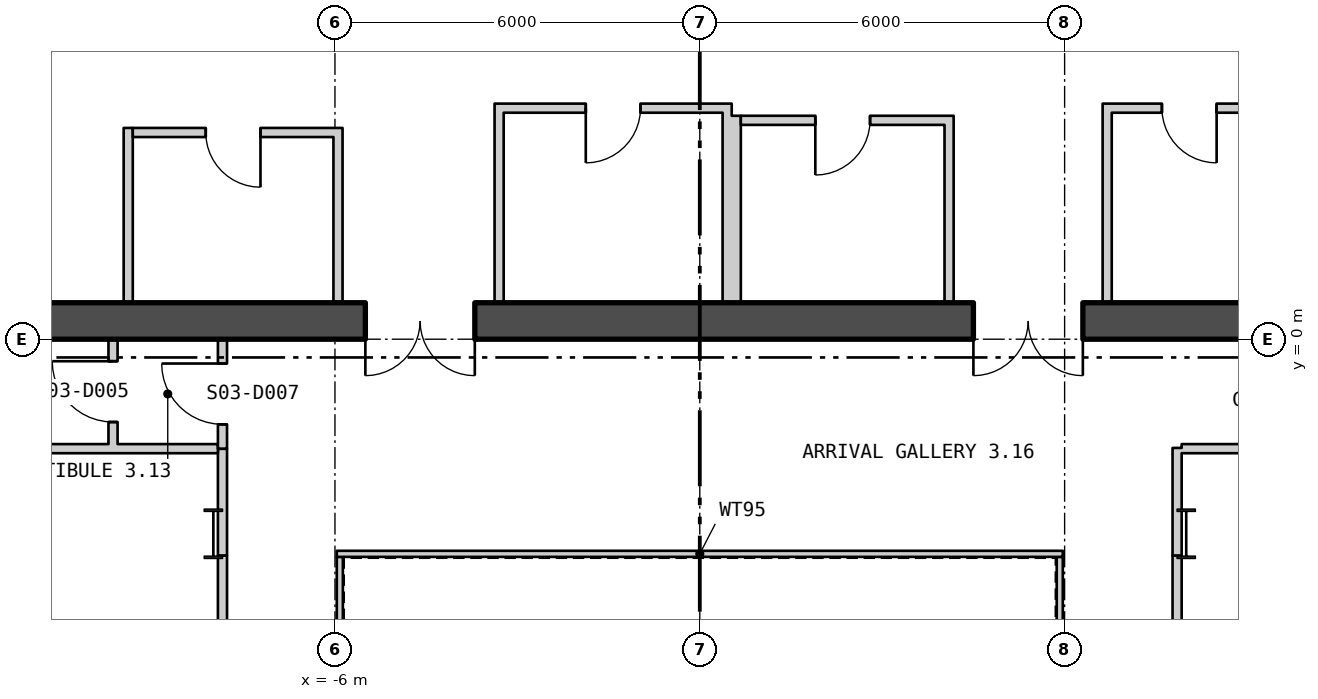
"""IFC4 building model, lengths in metres.
Left out: names, types, materials, properties, quantities, classifications, styles, units other than length and angle.
Written with IfcOpenShell. Run it as: python <this file> out.ifc"""

import sys

from ifc_helpers import new_model, si_unit, direction, frame, frame_2d, origin, origin_2d, place, context, subcontext, project, spatial, polyline, rectangle, i_section, outline, extrude, element, fill, save


model = new_model("IFC4")
c1 = context("Model", 3, precision=1e-05, world=origin(), true_north=direction((0.0, 1.0)))
c2 = subcontext(c1, "Body", "Model", "MODEL_VIEW")
j1 = project(units=[si_unit("LENGTHUNIT", "METRE"), si_unit("PLANEANGLEUNIT", "RADIAN")], contexts=[c1])
p1 = place(None, origin())
s1 = spatial("IfcSite", under=j1, at=p1, CompositionType="ELEMENT")
p2 = place(p1, origin())
s2 = spatial("IfcBuilding", under=s1, at=p2, CompositionType="ELEMENT")
p3 = place(p2, frame((0.0, 0.0, 46.8)))
s3 = spatial("IfcBuildingStorey", under=s2, at=p3, CompositionType="ELEMENT", Elevation=46.8)
for number, where, z_axis, x_axis in (
    (1, (8.0, -3.2, 0.0), (0.0, 0.0, 1.0), (1.0, 0.0, 0.0)),
    (2, (-8.0, -3.2, 0.0), (0.0, 0.0, 1.0), (1.0, 0.0, 0.0)),
):
    element("IfcColumn", number, at=place(p3, frame(where, z_axis=z_axis, x_axis=x_axis)), inside=s3, PredefinedType="COLUMN", context=c2, shape_type="SweptSolid", body=[
        extrude(i_section(OverallWidth=0.303, OverallDepth=0.814, WebThickness=0.021, FlangeThickness=0.04, at=origin_2d()), origin(), (0.0, 0.0, 1.0), 4.5),
    ])
p4 = place(p3, frame((-28.445, 10.319, -0.18), z_axis=(0.0, 0.0, 1.0), x_axis=(0.499999764979, -0.866025539474, 0.0)))
e3 = element("IfcWall", 3, at=p4, inside=s3, PredefinedType="SOLIDWALL", context=c2, shape_type="SweptSolid", body=[
    extrude(outline(polyline([(-0.13, -0.225), (45.87, -0.225), (45.61, 0.225), (0.13, 0.225), (-0.13, -0.225)])), origin(), (0.0, 0.0, 1.0), 4.28),
])
p5 = place(p4, frame((1.424, 0.0, 1.08)))
e4 = element("IfcOpeningElement", 4, at=p5, cuts=e3, PredefinedType="OPENING", context=c2, shape_type="SweptSolid", body=[
    extrude(rectangle(XDim=2.4, YDim=2.6, at=frame_2d((1.2, 1.3))), frame((0.0, 0.235, 0.0), z_axis=(0.0, -1.0, 0.0), x_axis=(1.0, 0.0, 0.0)), (0.0, 0.0, 1.0), 0.47),
])
p6 = place(p4, frame((5.893, 0.0, 1.08)))
e5 = element("IfcOpeningElement", 5, at=p6, cuts=e3, PredefinedType="OPENING", context=c2, shape_type="SweptSolid", body=[
    extrude(rectangle(XDim=2.4, YDim=2.6, at=frame_2d((1.2, 1.3))), frame((0.0, 0.235, 0.0), z_axis=(0.0, -1.0, 0.0), x_axis=(1.0, 0.0, 0.0)), (0.0, 0.0, 1.0), 0.47),
])
p7 = place(p4, frame((10.401, 0.0, 1.08)))
e6 = element("IfcOpeningElement", 6, at=p7, cuts=e3, PredefinedType="OPENING", context=c2, shape_type="SweptSolid", body=[
    extrude(rectangle(XDim=2.4, YDim=2.6, at=frame_2d((1.2, 1.3))), frame((0.0, 0.235, 0.0), z_axis=(0.0, -1.0, 0.0), x_axis=(1.0, 0.0, 0.0)), (0.0, 0.0, 1.0), 0.47),
])
p8 = place(p4, frame((14.909, 0.0, 1.08)))
e7 = element("IfcOpeningElement", 7, at=p8, cuts=e3, PredefinedType="OPENING", context=c2, shape_type="SweptSolid", body=[
    extrude(rectangle(XDim=2.4, YDim=2.6, at=frame_2d((1.2, 1.3))), frame((0.0, 0.235, 0.0), z_axis=(0.0, -1.0, 0.0), x_axis=(1.0, 0.0, 0.0)), (0.0, 0.0, 1.0), 0.47),
])
p9 = place(p4, frame((19.416, 0.0, 1.08)))
e8 = element("IfcOpeningElement", 8, at=p9, cuts=e3, PredefinedType="OPENING", context=c2, shape_type="SweptSolid", body=[
    extrude(rectangle(XDim=2.4, YDim=2.6, at=frame_2d((1.2, 1.3))), frame((0.0, 0.235, 0.0), z_axis=(0.0, -1.0, 0.0), x_axis=(1.0, 0.0, 0.0)), (0.0, 0.0, 1.0), 0.47),
])
p10 = place(p4, frame((23.924, 0.0, 1.08)))
e9 = element("IfcOpeningElement", 9, at=p10, cuts=e3, PredefinedType="OPENING", context=c2, shape_type="SweptSolid", body=[
    extrude(rectangle(XDim=2.4, YDim=2.6, at=frame_2d((1.2, 1.3))), frame((0.0, 0.235, 0.0), z_axis=(0.0, -1.0, 0.0), x_axis=(1.0, 0.0, 0.0)), (0.0, 0.0, 1.0), 0.47),
])
p11 = place(p4, frame((28.431, 0.0, 1.08)))
e10 = element("IfcOpeningElement", 10, at=p11, cuts=e3, PredefinedType="OPENING", context=c2, shape_type="SweptSolid", body=[
    extrude(rectangle(XDim=2.4, YDim=2.6, at=frame_2d((1.2, 1.3))), frame((0.0, 0.235, 0.0), z_axis=(0.0, -1.0, 0.0), x_axis=(1.0, 0.0, 0.0)), (0.0, 0.0, 1.0), 0.47),
])
p12 = place(p4, frame((32.939, 0.0, 1.08)))
e11 = element("IfcOpeningElement", 11, at=p12, cuts=e3, PredefinedType="OPENING", context=c2, shape_type="SweptSolid", body=[
    extrude(rectangle(XDim=2.4, YDim=2.6, at=frame_2d((1.2, 1.3))), frame((0.0, 0.235, 0.0), z_axis=(0.0, -1.0, 0.0), x_axis=(1.0, 0.0, 0.0)), (0.0, 0.0, 1.0), 0.47),
])
p13 = place(p4, frame((37.447, 0.0, 1.08)))
e12 = element("IfcOpeningElement", 12, at=p13, cuts=e3, PredefinedType="OPENING", context=c2, shape_type="SweptSolid", body=[
    extrude(rectangle(XDim=2.4, YDim=2.6, at=frame_2d((1.2, 1.3))), frame((0.0, 0.235, 0.0), z_axis=(0.0, -1.0, 0.0), x_axis=(1.0, 0.0, 0.0)), (0.0, 0.0, 1.0), 0.47),
])
p14 = place(p4, frame((41.916, 0.0, 1.08)))
e13 = element("IfcOpeningElement", 13, at=p14, cuts=e3, PredefinedType="OPENING", context=c2, shape_type="SweptSolid", body=[
    extrude(rectangle(XDim=2.4, YDim=2.6, at=frame_2d((1.2, 1.3))), frame((0.0, 0.235, 0.0), z_axis=(0.0, -1.0, 0.0), x_axis=(1.0, 0.0, 0.0)), (0.0, 0.0, 1.0), 0.47),
])
p15 = place(p3, frame((5.575, -29.294, -0.18), z_axis=(0.0, 0.0, 1.0), x_axis=(0.499999764979, 0.866025539474, 0.0)))
e14 = element("IfcWall", 14, at=p15, inside=s3, PredefinedType="SOLIDWALL", context=c2, shape_type="SweptSolid", body=[
    extrude(outline(polyline([(-0.13, -0.225), (45.87, -0.225), (45.61, 0.225), (0.13, 0.225), (-0.13, -0.225)])), origin(), (0.0, 0.0, 1.0), 4.28),
])
p16 = place(p15, frame((1.424, 0.0, 1.08)))
e15 = element("IfcOpeningElement", 15, at=p16, cuts=e14, PredefinedType="OPENING", context=c2, shape_type="SweptSolid", body=[
    extrude(rectangle(XDim=2.4, YDim=2.6, at=frame_2d((1.2, 1.3))), frame((0.0, 0.235, 0.0), z_axis=(0.0, -1.0, 0.0), x_axis=(1.0, 0.0, 0.0)), (0.0, 0.0, 1.0), 0.47),
])
p17 = place(p15, frame((5.893, 0.0, 1.08)))
e16 = element("IfcOpeningElement", 16, at=p17, cuts=e14, PredefinedType="OPENING", context=c2, shape_type="SweptSolid", body=[
    extrude(rectangle(XDim=2.4, YDim=2.6, at=frame_2d((1.2, 1.3))), frame((0.0, 0.235, 0.0), z_axis=(0.0, -1.0, 0.0), x_axis=(1.0, 0.0, 0.0)), (0.0, 0.0, 1.0), 0.47),
])
p18 = place(p15, frame((10.401, 0.0, 1.08)))
e17 = element("IfcOpeningElement", 17, at=p18, cuts=e14, PredefinedType="OPENING", context=c2, shape_type="SweptSolid", body=[
    extrude(rectangle(XDim=2.4, YDim=2.6, at=frame_2d((1.2, 1.3))), frame((0.0, 0.235, 0.0), z_axis=(0.0, -1.0, 0.0), x_axis=(1.0, 0.0, 0.0)), (0.0, 0.0, 1.0), 0.47),
])
p19 = place(p15, frame((14.909, 0.0, 1.08)))
e18 = element("IfcOpeningElement", 18, at=p19, cuts=e14, PredefinedType="OPENING", context=c2, shape_type="SweptSolid", body=[
    extrude(rectangle(XDim=2.4, YDim=2.6, at=frame_2d((1.2, 1.3))), frame((0.0, 0.235, 0.0), z_axis=(0.0, -1.0, 0.0), x_axis=(1.0, 0.0, 0.0)), (0.0, 0.0, 1.0), 0.47),
])
p20 = place(p15, frame((19.416, 0.0, 1.08)))
e19 = element("IfcOpeningElement", 19, at=p20, cuts=e14, PredefinedType="OPENING", context=c2, shape_type="SweptSolid", body=[
    extrude(rectangle(XDim=2.4, YDim=2.6, at=frame_2d((1.2, 1.3))), frame((0.0, 0.235, 0.0), z_axis=(0.0, -1.0, 0.0), x_axis=(1.0, 0.0, 0.0)), (0.0, 0.0, 1.0), 0.47),
])
p21 = place(p15, frame((23.924, 0.0, 1.08)))
e20 = element("IfcOpeningElement", 20, at=p21, cuts=e14, PredefinedType="OPENING", context=c2, shape_type="SweptSolid", body=[
    extrude(rectangle(XDim=2.4, YDim=2.6, at=frame_2d((1.2, 1.3))), frame((0.0, 0.235, 0.0), z_axis=(0.0, -1.0, 0.0), x_axis=(1.0, 0.0, 0.0)), (0.0, 0.0, 1.0), 0.47),
])
p22 = place(p15, frame((37.447, 0.0, 1.08)))
e21 = element("IfcOpeningElement", 21, at=p22, cuts=e14, PredefinedType="OPENING", context=c2, shape_type="SweptSolid", body=[
    extrude(rectangle(XDim=2.4, YDim=2.6, at=frame_2d((1.2, 1.3))), frame((0.0, 0.235, 0.0), z_axis=(0.0, -1.0, 0.0), x_axis=(1.0, 0.0, 0.0)), (0.0, 0.0, 1.0), 0.47),
])
p23 = place(p15, frame((41.916, 0.0, 1.08)))
e22 = element("IfcOpeningElement", 22, at=p23, cuts=e14, PredefinedType="OPENING", context=c2, shape_type="SweptSolid", body=[
    extrude(rectangle(XDim=2.4, YDim=2.6, at=frame_2d((1.2, 1.3))), frame((0.0, 0.235, 0.0), z_axis=(0.0, -1.0, 0.0), x_axis=(1.0, 0.0, 0.0)), (0.0, 0.0, 1.0), 0.47),
])
p24 = place(p3, frame((5.92, -11.62, 0.0), z_axis=(0.0, 0.0, 1.0), x_axis=(0.0, 1.0, 0.0)))
e23 = element("IfcWall", 23, at=p24, inside=s3, PredefinedType="PARTITIONING", context=c2, shape_type="SweptSolid", body=[
    extrude(rectangle(XDim=8.04, YDim=0.1, at=frame_2d((4.02, 0.0))), origin(), (0.0, 0.0, 1.0), 4.3),
])
p25 = place(p3, frame((5.97, -3.53, 0.0), z_axis=(0.0, 0.0, 1.0), x_axis=(-1.0, 0.0, 0.0)))
e24 = element("IfcWall", 24, at=p25, inside=s3, PredefinedType="PARTITIONING", context=c2, shape_type="SweptSolid", body=[
    extrude(rectangle(XDim=11.94, YDim=0.1, at=frame_2d((5.97, 0.0))), origin(), (0.0, 0.0, 1.0), 4.3),
])
p26 = place(p3, frame((-5.92, -3.58, 0.0), z_axis=(0.0, 0.0, 1.0), x_axis=(0.0, -1.0, 0.0)))
e25 = element("IfcWall", 25, at=p26, inside=s3, PredefinedType="PARTITIONING", context=c2, shape_type="SweptSolid", body=[
    extrude(rectangle(XDim=8.04, YDim=0.1, at=frame_2d((4.02, 0.0))), origin(), (0.0, 0.0, 1.0), 4.3),
])
p27 = place(p3, frame((-17.5, 0.3, 0.0), z_axis=(0.0, 0.0, 1.0), x_axis=(1.0, 0.0, 0.0)))
e26 = element("IfcWall", 26, at=p27, inside=s3, PredefinedType="SHEAR", context=c2, shape_type="SweptSolid", body=[
    extrude(rectangle(XDim=35.0, YDim=0.6, at=frame_2d((17.5, 0.0))), origin(), (0.0, 0.0, 1.0), 4.3),
])
p28 = place(p27, frame((12.0, 0.0, 0.0)))
e27 = element("IfcOpeningElement", 27, at=p28, cuts=e26, PredefinedType="OPENING", context=c2, shape_type="SweptSolid", body=[
    extrude(rectangle(XDim=1.8, YDim=2.4, at=frame_2d((0.9, 1.2))), frame((0.0, 0.31, 0.0), z_axis=(0.0, -1.0, 0.0), x_axis=(1.0, 0.0, 0.0)), (0.0, 0.0, 1.0), 0.62),
])
p29 = place(p27, frame((22.0, 0.0, 0.0)))
e28 = element("IfcOpeningElement", 28, at=p29, cuts=e26, PredefinedType="OPENING", context=c2, shape_type="SweptSolid", body=[
    extrude(rectangle(XDim=1.8, YDim=2.4, at=frame_2d((0.9, 1.2))), frame((0.0, 0.31, 0.0), z_axis=(0.0, -1.0, 0.0), x_axis=(1.0, 0.0, 0.0)), (0.0, 0.0, 1.0), 0.62),
])
for number, where, z_axis, x_axis in (
    (29, (-9.4, 0.6, 0.0), (0.0, 0.0, 1.0), (0.0, 1.0, 0.0)),
    (30, (-5.95, 0.6, 0.0), (0.0, 0.0, 1.0), (0.0, 1.0, 0.0)),
):
    element("IfcWall", number, at=place(p3, frame(where, z_axis=z_axis, x_axis=x_axis)), inside=s3, PredefinedType="PARTITIONING", context=c2, shape_type="SweptSolid", body=[
        extrude(rectangle(XDim=2.875, YDim=0.15, at=frame_2d((1.438, 0.0))), origin(), (0.0, 0.0, 1.0), 4.3),
    ])
p30 = place(p3, frame((-9.325, 3.4, 0.0), z_axis=(0.0, 0.0, 1.0), x_axis=(1.0, 0.0, 0.0)))
e31 = element("IfcWall", 31, at=p30, inside=s3, PredefinedType="PARTITIONING", context=c2, shape_type="SweptSolid", body=[
    extrude(rectangle(XDim=3.3, YDim=0.15, at=frame_2d((1.65, 0.0))), origin(), (0.0, 0.0, 1.0), 4.3),
])
p31 = place(p30, frame((1.2, 0.0, 0.0)))
e32 = element("IfcOpeningElement", 32, at=p31, cuts=e31, PredefinedType="OPENING", context=c2, shape_type="SweptSolid", body=[
    extrude(rectangle(XDim=0.9, YDim=2.1, at=frame_2d((0.45, 1.05))), frame((0.0, 0.085, 0.0), z_axis=(0.0, -1.0, 0.0), x_axis=(1.0, 0.0, 0.0)), (0.0, 0.0, 1.0), 0.17),
])
for number, where, z_axis, x_axis in (
    (33, (-3.3, 0.6, 0.0), (0.0, 0.0, 1.0), (0.0, 1.0, 0.0)),
    (34, (0.45, 0.6, 0.0), (0.0, 0.0, 1.0), (0.0, 1.0, 0.0)),
):
    element("IfcWall", number, at=place(p3, frame(where, z_axis=z_axis, x_axis=x_axis)), inside=s3, PredefinedType="PARTITIONING", context=c2, shape_type="SweptSolid", body=[
        extrude(rectangle(XDim=3.275, YDim=0.15, at=frame_2d((1.637, 0.0))), origin(), (0.0, 0.0, 1.0), 4.3),
    ])
p32 = place(p3, frame((-3.225, 3.8, 0.0), z_axis=(0.0, 0.0, 1.0), x_axis=(1.0, 0.0, 0.0)))
e35 = element("IfcWall", 35, at=p32, inside=s3, PredefinedType="PARTITIONING", context=c2, shape_type="SweptSolid", body=[
    extrude(rectangle(XDim=3.6, YDim=0.15, at=frame_2d((1.8, 0.0))), origin(), (0.0, 0.0, 1.0), 4.3),
])
p33 = place(p32, frame((1.35, 0.0, 0.0)))
e36 = element("IfcOpeningElement", 36, at=p33, cuts=e35, PredefinedType="OPENING", context=c2, shape_type="SweptSolid", body=[
    extrude(rectangle(XDim=0.9, YDim=2.1, at=frame_2d((0.45, 1.05))), frame((0.0, 0.085, 0.0), z_axis=(0.0, -1.0, 0.0), x_axis=(1.0, 0.0, 0.0)), (0.0, 0.0, 1.0), 0.17),
])
for number, where, z_axis, x_axis in (
    (37, (0.6, 0.6, 0.0), (0.0, 0.0, 1.0), (0.0, 1.0, 0.0)),
    (38, (4.1, 0.6, 0.0), (0.0, 0.0, 1.0), (0.0, 1.0, 0.0)),
):
    element("IfcWall", number, at=place(p3, frame(where, z_axis=z_axis, x_axis=x_axis)), inside=s3, PredefinedType="PARTITIONING", context=c2, shape_type="SweptSolid", body=[
        extrude(rectangle(XDim=3.075, YDim=0.15, at=frame_2d((1.538, 0.0))), origin(), (0.0, 0.0, 1.0), 4.3),
    ])
p34 = place(p3, frame((0.675, 3.6, 0.0), z_axis=(0.0, 0.0, 1.0), x_axis=(1.0, 0.0, 0.0)))
e39 = element("IfcWall", 39, at=p34, inside=s3, PredefinedType="PARTITIONING", context=c2, shape_type="SweptSolid", body=[
    extrude(rectangle(XDim=3.35, YDim=0.15, at=frame_2d((1.675, 0.0))), origin(), (0.0, 0.0, 1.0), 4.3),
])
p35 = place(p34, frame((1.225, 0.0, 0.0)))
e40 = element("IfcOpeningElement", 40, at=p35, cuts=e39, PredefinedType="OPENING", context=c2, shape_type="SweptSolid", body=[
    extrude(rectangle(XDim=0.9, YDim=2.1, at=frame_2d((0.45, 1.05))), frame((0.0, 0.085, 0.0), z_axis=(0.0, -1.0, 0.0), x_axis=(1.0, 0.0, 0.0)), (0.0, 0.0, 1.0), 0.17),
])
p36 = place(p3, frame((6.7, 0.6, 0.0), z_axis=(0.0, 0.0, 1.0), x_axis=(0.0, 1.0, 0.0)))
e41 = element("IfcWall", 41, at=p36, inside=s3, PredefinedType="PARTITIONING", context=c2, shape_type="SweptSolid", body=[
    extrude(rectangle(XDim=3.275, YDim=0.15, at=frame_2d((1.637, 0.0))), origin(), (0.0, 0.0, 1.0), 4.3),
])
p37 = place(p3, frame((6.775, 3.8, 0.0), z_axis=(0.0, 0.0, 1.0), x_axis=(1.0, 0.0, 0.0)))
e42 = element("IfcWall", 42, at=p37, inside=s3, PredefinedType="PARTITIONING", context=c2, shape_type="SweptSolid", body=[
    extrude(rectangle(XDim=2.55, YDim=0.15, at=frame_2d((1.275, 0.0))), origin(), (0.0, 0.0, 1.0), 4.3),
])
p38 = place(p37, frame((0.825, 0.0, 0.0)))
e43 = element("IfcOpeningElement", 43, at=p38, cuts=e42, PredefinedType="OPENING", context=c2, shape_type="SweptSolid", body=[
    extrude(rectangle(XDim=0.9, YDim=2.1, at=frame_2d((0.45, 1.05))), frame((0.0, 0.085, 0.0), z_axis=(0.0, -1.0, 0.0), x_axis=(1.0, 0.0, 0.0)), (0.0, 0.0, 1.0), 0.17),
])
p39 = place(p3, frame((-19.225, -1.8, 0.0), z_axis=(0.0, 0.0, 1.0), x_axis=(1.0, 0.0, 0.0)))
e44 = element("IfcWall", 44, at=p39, inside=s3, PredefinedType="PARTITIONING", context=c2, shape_type="SweptSolid", body=[
    extrude(rectangle(XDim=11.3, YDim=0.15, at=frame_2d((5.65, 0.0))), origin(), (0.0, 0.0, 1.0), 4.3),
])
p40 = place(p3, frame((-9.65, -1.725, 0.0), z_axis=(0.0, 0.0, 1.0), x_axis=(0.0, 1.0, 0.0)))
e45 = element("IfcWall", 45, at=p40, inside=s3, PredefinedType="PARTITIONING", context=c2, shape_type="SweptSolid", body=[
    extrude(rectangle(XDim=1.725, YDim=0.15, at=frame_2d((0.863, 0.0))), origin(), (0.0, 0.0, 1.0), 3.7),
])
p41 = place(p40, frame((0.363, 0.0, 0.0)))
e46 = element("IfcOpeningElement", 46, at=p41, cuts=e45, PredefinedType="OPENING", context=c2, shape_type="SweptSolid", body=[
    extrude(rectangle(XDim=1.0, YDim=2.1, at=frame_2d((0.5, 1.05))), frame((0.0, 0.085, 0.0), z_axis=(0.0, -1.0, 0.0), x_axis=(1.0, 0.0, 0.0)), (0.0, 0.0, 1.0), 0.17),
])
p42 = place(p3, frame((-7.85, -13.675, 0.0), z_axis=(0.0, 0.0, 1.0), x_axis=(0.0, 1.0, 0.0)))
e47 = element("IfcWall", 47, at=p42, inside=s3, PredefinedType="PARTITIONING", context=c2, shape_type="SweptSolid", body=[
    extrude(rectangle(XDim=10.118, YDim=0.15, at=frame_2d((5.059, 0.0))), origin(), (0.0, 0.0, 1.0), 3.61),
])
p43 = place(p42, frame((1.646, 0.0, 0.0)))
e48 = element("IfcOpeningElement", 48, at=p43, cuts=e47, PredefinedType="OPENING", context=c2, shape_type="SweptSolid", body=[
    extrude(rectangle(XDim=1.0, YDim=2.1, at=frame_2d((0.5, 1.05))), frame((0.0, 0.085, 0.0), z_axis=(0.0, -1.0, 0.0), x_axis=(1.0, 0.0, 0.0)), (0.0, 0.0, 1.0), 0.17),
])
p44 = place(p3, frame((-7.85, -3.557, 0.0), z_axis=(0.0, 0.0, 1.0), x_axis=(0.0, 1.0, 0.0)))
e49 = element("IfcWall", 49, at=p44, inside=s3, PredefinedType="PARTITIONING", context=c2, shape_type="SweptSolid", body=[
    extrude(rectangle(XDim=1.754, YDim=0.15, at=frame_2d((0.877, 0.0))), origin(), (0.0, 0.0, 1.0), 4.3),
])
p45 = place(p3, frame((-7.85, -1.8, 0.0), z_axis=(0.0, 0.0, 1.0), x_axis=(0.0, 1.0, 0.0)))
e50 = element("IfcWall", 50, at=p45, inside=s3, PredefinedType="PARTITIONING", context=c2, shape_type="SweptSolid", body=[
    extrude(rectangle(XDim=1.8, YDim=0.15, at=frame_2d((0.9, 0.0))), origin(), (0.0, 0.0, 1.0), 4.3),
])
p46 = place(p45, frame((0.4, 0.0, 0.0)))
e51 = element("IfcOpeningElement", 51, at=p46, cuts=e50, PredefinedType="OPENING", context=c2, shape_type="SweptSolid", body=[
    extrude(rectangle(XDim=1.0, YDim=2.1, at=frame_2d((0.5, 1.05))), frame((0.0, 0.085, 0.0), z_axis=(0.0, -1.0, 0.0), x_axis=(1.0, 0.0, 0.0)), (0.0, 0.0, 1.0), 0.17),
])
p47 = place(p3, frame((7.85, -13.675, 0.0), z_axis=(0.0, 0.0, 1.0), x_axis=(0.0, 1.0, 0.0)))
e52 = element("IfcWall", 52, at=p47, inside=s3, PredefinedType="PARTITIONING", context=c2, shape_type="SweptSolid", body=[
    extrude(rectangle(XDim=10.118, YDim=0.15, at=frame_2d((5.059, 0.0))), origin(), (0.0, 0.0, 1.0), 3.61),
])
p48 = place(p3, frame((7.85, -3.557, 0.0), z_axis=(0.0, 0.0, 1.0), x_axis=(0.0, 1.0, 0.0)))
e53 = element("IfcWall", 53, at=p48, inside=s3, PredefinedType="PARTITIONING", context=c2, shape_type="SweptSolid", body=[
    extrude(rectangle(XDim=1.769, YDim=0.15, at=frame_2d((0.884, 0.0))), origin(), (0.0, 0.0, 1.0), 4.3),
])
p49 = place(p3, frame((7.925, -1.8, 0.0), z_axis=(0.0, 0.0, 1.0), x_axis=(1.0, 0.0, 0.0)))
e54 = element("IfcWall", 54, at=p49, inside=s3, PredefinedType="PARTITIONING", context=c2, shape_type="SweptSolid", body=[
    extrude(rectangle(XDim=11.3, YDim=0.15, at=frame_2d((5.65, 0.0))), origin(), (0.0, 0.0, 1.0), 4.3),
])
p50 = place(p49, frame((7.087, 0.0, 0.0)))
e55 = element("IfcOpeningElement", 55, at=p50, cuts=e54, PredefinedType="OPENING", context=c2, shape_type="SweptSolid", body=[
    extrude(rectangle(XDim=1.0, YDim=2.1, at=frame_2d((0.5, 1.05))), frame((0.0, 0.085, 0.0), z_axis=(0.0, -1.0, 0.0), x_axis=(1.0, 0.0, 0.0)), (0.0, 0.0, 1.0), 0.17),
])
p51 = place(p31, origin())
e56 = element("IfcDoor", 56, at=p51, inside=s3, OperationType="SINGLE_SWING_RIGHT", PredefinedType="DOOR", context=c2, shape_type="SweptSolid", body=[
    extrude(rectangle(XDim=0.9, YDim=2.1, at=frame_2d((0.45, 1.05))), frame((0.0, 0.025, 0.0), z_axis=(0.0, -1.0, 0.0), x_axis=(1.0, 0.0, 0.0)), (0.0, 0.0, 1.0), 0.05),
])
fill(e32, e56)
p52 = place(p33, origin())
e57 = element("IfcDoor", 57, at=p52, inside=s3, OperationType="SINGLE_SWING_LEFT", PredefinedType="DOOR", context=c2, shape_type="SweptSolid", body=[
    extrude(rectangle(XDim=0.9, YDim=2.1, at=frame_2d((0.45, 1.05))), frame((0.0, 0.025, 0.0), z_axis=(0.0, -1.0, 0.0), x_axis=(1.0, 0.0, 0.0)), (0.0, 0.0, 1.0), 0.05),
])
fill(e36, e57)
p53 = place(p35, origin())
e58 = element("IfcDoor", 58, at=p53, inside=s3, OperationType="SINGLE_SWING_LEFT", PredefinedType="DOOR", context=c2, shape_type="SweptSolid", body=[
    extrude(rectangle(XDim=0.9, YDim=2.1, at=frame_2d((0.45, 1.05))), frame((0.0, 0.025, 0.0), z_axis=(0.0, -1.0, 0.0), x_axis=(1.0, 0.0, 0.0)), (0.0, 0.0, 1.0), 0.05),
])
fill(e40, e58)
p54 = place(p38, origin())
e59 = element("IfcDoor", 59, at=p54, inside=s3, OperationType="SINGLE_SWING_RIGHT", PredefinedType="DOOR", context=c2, shape_type="SweptSolid", body=[
    extrude(rectangle(XDim=0.9, YDim=2.1, at=frame_2d((0.45, 1.05))), frame((0.0, 0.025, 0.0), z_axis=(0.0, -1.0, 0.0), x_axis=(1.0, 0.0, 0.0)), (0.0, 0.0, 1.0), 0.05),
])
fill(e43, e59)
p55 = place(p28, origin())
e60 = element("IfcDoor", 60, at=p55, inside=s3, OperationType="DOUBLE_DOOR_SINGLE_SWING", PredefinedType="DOOR", context=c2, shape_type="SweptSolid", body=[
    extrude(rectangle(XDim=1.8, YDim=2.4, at=frame_2d((0.9, 1.2))), frame((0.0, 0.025, 0.0), z_axis=(0.0, -1.0, 0.0), x_axis=(1.0, 0.0, 0.0)), (0.0, 0.0, 1.0), 0.05),
])
fill(e27, e60)
p56 = place(p29, origin())
e61 = element("IfcDoor", 61, at=p56, inside=s3, OperationType="DOUBLE_DOOR_SINGLE_SWING", PredefinedType="DOOR", context=c2, shape_type="SweptSolid", body=[
    extrude(rectangle(XDim=1.8, YDim=2.4, at=frame_2d((0.9, 1.2))), frame((0.0, 0.025, 0.0), z_axis=(0.0, -1.0, 0.0), x_axis=(1.0, 0.0, 0.0)), (0.0, 0.0, 1.0), 0.05),
])
fill(e28, e61)
p57 = place(p41, origin())
e62 = element("IfcDoor", 62, at=p57, inside=s3, OperationType="SINGLE_SWING_LEFT", PredefinedType="DOOR", context=c2, shape_type="SweptSolid", body=[
    extrude(rectangle(XDim=1.0, YDim=2.1, at=frame_2d((0.5, 1.05))), frame((0.0, 0.025, 0.0), z_axis=(0.0, -1.0, 0.0), x_axis=(1.0, 0.0, 0.0)), (0.0, 0.0, 1.0), 0.05),
])
fill(e46, e62)
p58 = place(p46, origin())
e63 = element("IfcDoor", 63, at=p58, inside=s3, OperationType="SINGLE_SWING_LEFT", PredefinedType="DOOR", context=c2, shape_type="SweptSolid", body=[
    extrude(rectangle(XDim=1.0, YDim=2.1, at=frame_2d((0.5, 1.05))), frame((0.0, 0.025, 0.0), z_axis=(0.0, -1.0, 0.0), x_axis=(1.0, 0.0, 0.0)), (0.0, 0.0, 1.0), 0.05),
])
fill(e51, e63)
save(model, sys.argv[1])
